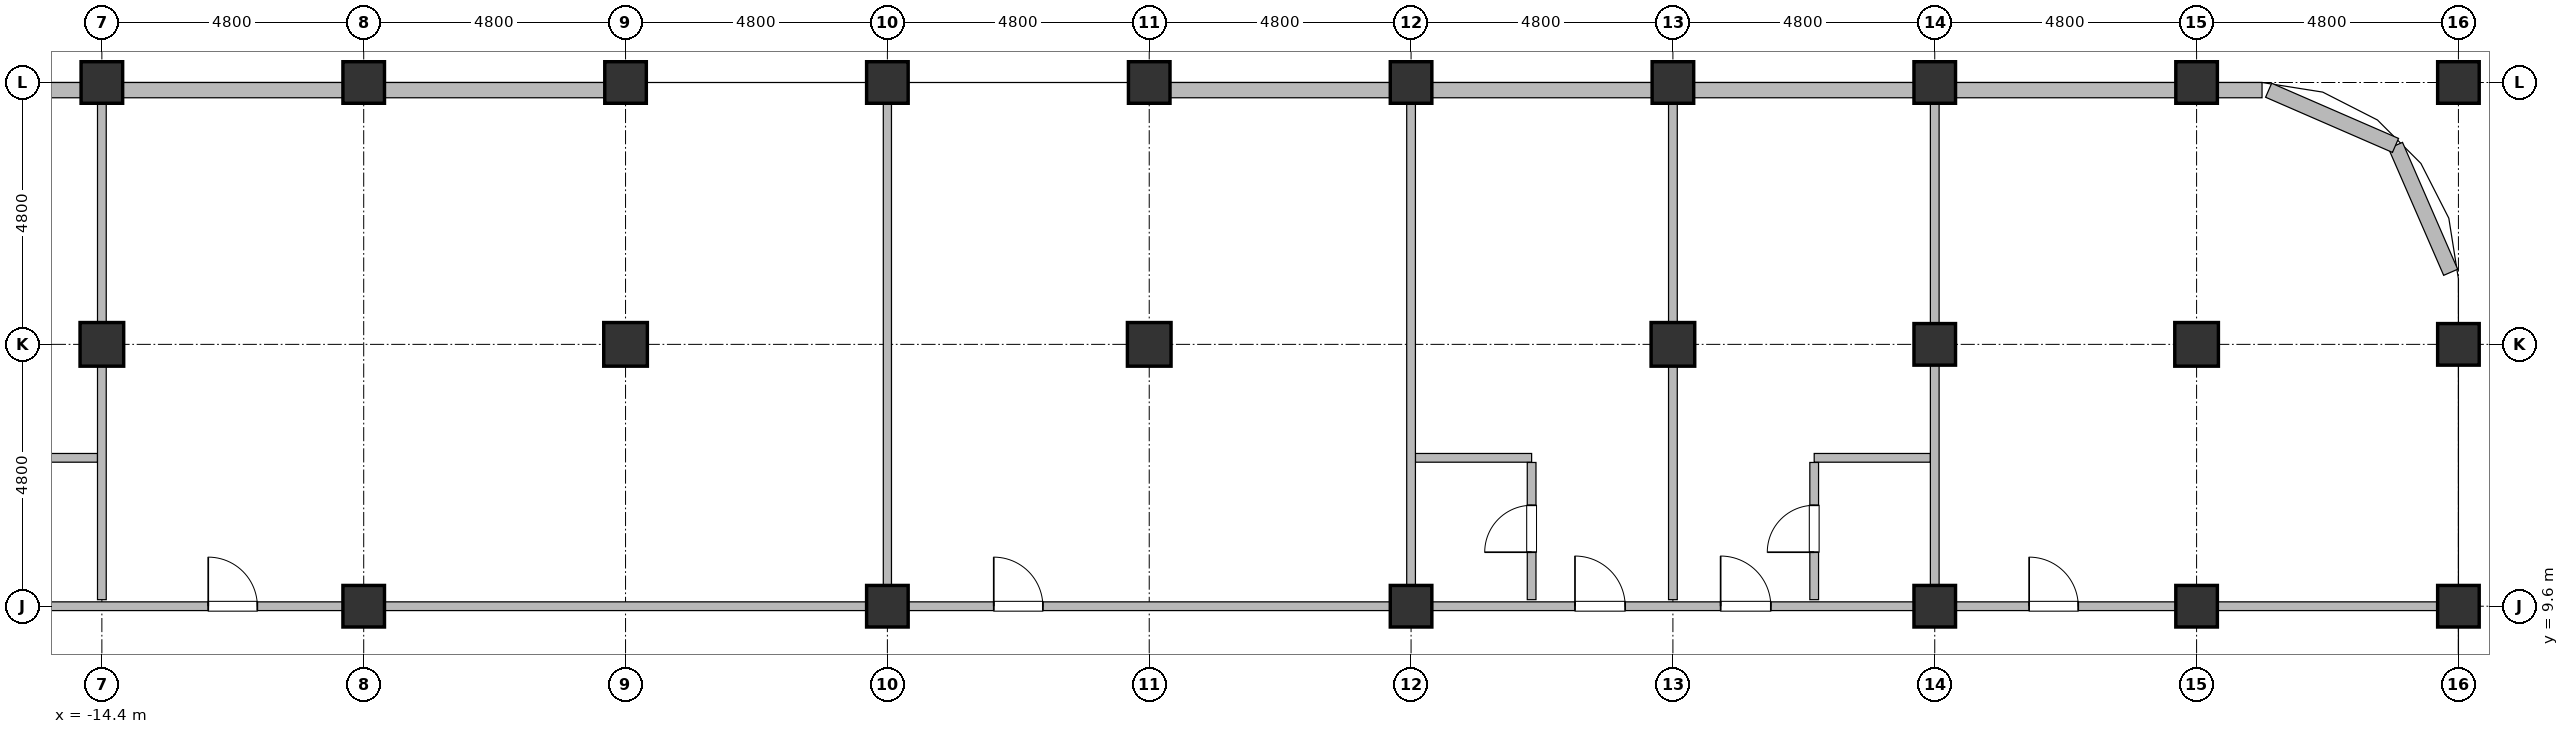
"""IFC4 building model, lengths in metres.
Left out: names, types, materials, properties, quantities, classifications, styles, units other than length and angle.
Written with IfcOpenShell. Run it as: python <this file> out.ifc"""

import sys

from ifc_helpers import new_model, si_unit, direction, frame, frame_2d, origin, origin_2d, place, context, subcontext, project, spatial, rectangle, hollow_rectangle, hollow_circle, extrude, element, fill, save


model = new_model("IFC4")
c1 = context("Model", 3, precision=1e-05, world=origin(), true_north=direction((0.0, 1.0)))
c2 = subcontext(c1, "Body", "Model", "MODEL_VIEW")
j1 = project(units=[si_unit("LENGTHUNIT", "METRE"), si_unit("PLANEANGLEUNIT", "RADIAN")], contexts=[c1])
p1 = place(None, origin())
s1 = spatial("IfcSite", under=j1, at=p1, CompositionType="ELEMENT")
p2 = place(p1, origin())
s2 = spatial("IfcBuilding", under=s1, at=p2, CompositionType="ELEMENT")
p3 = place(p2, frame((0.0, 0.0, 48.5)))
s3 = spatial("IfcBuildingStorey", under=s2, at=p3, CompositionType="ELEMENT", Elevation=48.5)
p4 = place(p3, frame((-14.4, 14.4, 0.0), z_axis=(0.0, 0.0, 1.0), x_axis=(1.0, 0.0, 0.0)))
e1 = element("IfcColumn", 1, at=p4, inside=s3, PredefinedType="COLUMN", context=c2, shape_type="SweptSolid", body=[
    extrude(hollow_rectangle(XDim=0.8, YDim=0.8, WallThickness=0.036, at=origin_2d()), origin(), (0.0, 0.0, 1.0), 3.7),
])
for number, where, z_axis, x_axis in (
    (2, (-14.4, 19.2, 0.0), (0.0, 0.0, 1.0), (1.0, 0.0, 0.0)),
    (3, (-9.6, 9.6, 0.0), (0.0, 0.0, 1.0), (1.0, 0.0, 0.0)),
    (4, (-9.6, 19.2, 0.0), (0.0, 0.0, 1.0), (1.0, 0.0, 0.0)),
):
    element("IfcColumn", number, at=place(p3, frame(where, z_axis=z_axis, x_axis=x_axis)), inside=s3, PredefinedType="COLUMN", context=c2, shape_type="SweptSolid", body=[
        extrude(hollow_circle(Radius=0.381, WallThickness=0.032, at=origin_2d()), origin(), (0.0, 0.0, 1.0), 3.7),
    ])
p5 = place(p3, frame((-4.8, 14.4, 0.0), z_axis=(0.0, 0.0, 1.0), x_axis=(1.0, 0.0, 0.0)))
e5 = element("IfcColumn", 5, at=p5, inside=s3, PredefinedType="COLUMN", context=c2, shape_type="SweptSolid", body=[
    extrude(hollow_rectangle(XDim=0.8, YDim=0.8, WallThickness=0.036, at=origin_2d()), origin(), (0.0, 0.0, 1.0), 3.7),
])
for number, where, z_axis, x_axis in (
    (6, (-4.8, 19.2, 0.0), (0.0, 0.0, 1.0), (1.0, 0.0, 0.0)),
    (7, (0.0, 9.6, 0.0), (0.0, 0.0, 1.0), (1.0, 0.0, 0.0)),
    (8, (0.0, 19.2, 0.0), (0.0, 0.0, 1.0), (1.0, 0.0, 0.0)),
):
    element("IfcColumn", number, at=place(p3, frame(where, z_axis=z_axis, x_axis=x_axis)), inside=s3, PredefinedType="COLUMN", context=c2, shape_type="SweptSolid", body=[
        extrude(hollow_circle(Radius=0.381, WallThickness=0.032, at=origin_2d()), origin(), (0.0, 0.0, 1.0), 3.7),
    ])
p6 = place(p3, frame((4.8, 14.4, 0.0), z_axis=(0.0, 0.0, 1.0), x_axis=(1.0, 0.0, 0.0)))
e9 = element("IfcColumn", 9, at=p6, inside=s3, PredefinedType="COLUMN", context=c2, shape_type="SweptSolid", body=[
    extrude(hollow_rectangle(XDim=0.8, YDim=0.8, WallThickness=0.036, at=origin_2d()), origin(), (0.0, 0.0, 1.0), 3.7),
])
for number, where, z_axis, x_axis in (
    (10, (4.8, 19.2, 0.0), (0.0, 0.0, 1.0), (1.0, 0.0, 0.0)),
    (11, (9.6, 9.6, 0.0), (0.0, 0.0, 1.0), (1.0, 0.0, 0.0)),
    (12, (9.6, 19.2, 0.0), (0.0, 0.0, 1.0), (1.0, 0.0, 0.0)),
):
    element("IfcColumn", number, at=place(p3, frame(where, z_axis=z_axis, x_axis=x_axis)), inside=s3, PredefinedType="COLUMN", context=c2, shape_type="SweptSolid", body=[
        extrude(hollow_circle(Radius=0.381, WallThickness=0.032, at=origin_2d()), origin(), (0.0, 0.0, 1.0), 3.7),
    ])
p7 = place(p3, frame((14.4, 14.4, 0.0), z_axis=(0.0, 0.0, 1.0), x_axis=(1.0, 0.0, 0.0)))
e13 = element("IfcColumn", 13, at=p7, inside=s3, PredefinedType="COLUMN", context=c2, shape_type="SweptSolid", body=[
    extrude(hollow_rectangle(XDim=0.8, YDim=0.8, WallThickness=0.036, at=origin_2d()), origin(), (0.0, 0.0, 1.0), 3.7),
])
for number, where, z_axis, x_axis in (
    (14, (14.4, 19.2, 0.0), (0.0, 0.0, 1.0), (1.0, 0.0, 0.0)),
    (15, (19.2, 9.6, 0.0), (0.0, 0.0, 1.0), (1.0, 0.0, 0.0)),
    (16, (19.2, 14.4, 0.0), (0.0, 0.0, 1.0), (1.0, 0.0, 0.0)),
    (17, (19.2, 19.2, 0.0), (0.0, 0.0, 1.0), (1.0, 0.0, 0.0)),
    (18, (24.0, 9.6, 0.0), (0.0, 0.0, 1.0), (1.0, 0.0, 0.0)),
):
    element("IfcColumn", number, at=place(p3, frame(where, z_axis=z_axis, x_axis=x_axis)), inside=s3, PredefinedType="COLUMN", context=c2, shape_type="SweptSolid", body=[
        extrude(hollow_circle(Radius=0.381, WallThickness=0.032, at=origin_2d()), origin(), (0.0, 0.0, 1.0), 3.7),
    ])
p8 = place(p3, frame((24.0, 14.4, 0.0), z_axis=(0.0, 0.0, 1.0), x_axis=(1.0, 0.0, 0.0)))
e19 = element("IfcColumn", 19, at=p8, inside=s3, PredefinedType="COLUMN", context=c2, shape_type="SweptSolid", body=[
    extrude(hollow_rectangle(XDim=0.8, YDim=0.8, WallThickness=0.036, at=origin_2d()), origin(), (0.0, 0.0, 1.0), 3.7),
])
for number, where, z_axis, x_axis in (
    (20, (24.0, 19.2, 0.0), (0.0, 0.0, 1.0), (1.0, 0.0, 0.0)),
    (21, (28.8, 9.6, 0.0), (0.0, 0.0, 1.0), (1.0, 0.0, 0.0)),
    (22, (28.8, 14.4, 0.0), (0.0, 0.0, 1.0), (1.0, 0.0, 0.0)),
    (23, (28.8, 19.2, 0.0), (0.0, 0.0, 1.0), (1.0, 0.0, 0.0)),
):
    element("IfcColumn", number, at=place(p3, frame(where, z_axis=z_axis, x_axis=x_axis)), inside=s3, PredefinedType="COLUMN", context=c2, shape_type="SweptSolid", body=[
        extrude(hollow_circle(Radius=0.381, WallThickness=0.032, at=origin_2d()), origin(), (0.0, 0.0, 1.0), 3.7),
    ])
p9 = place(p3, frame((28.658, 15.721, 0.0), z_axis=(0.0, 0.0, 1.0), x_axis=(-0.398792985289, 0.917040977756, 0.0)))
e24 = element("IfcWall", 24, at=p9, inside=s3, PredefinedType="SOLIDWALL", context=c2, shape_type="SweptSolid", body=[
    extrude(rectangle(XDim=2.536, YDim=0.28, at=frame_2d((1.268, 0.0))), origin(), (0.0, 0.0, 1.0), 2.82),
])
p10 = place(p3, frame((27.646, 18.047, 0.0), z_axis=(0.0, 0.0, 1.0), x_axis=(-0.917060872934, 0.398747232384, 0.0)))
e25 = element("IfcWall", 25, at=p10, inside=s3, PredefinedType="SOLIDWALL", context=c2, shape_type="SweptSolid", body=[
    extrude(rectangle(XDim=2.536, YDim=0.28, at=frame_2d((1.268, 0.0))), origin(), (0.0, 0.0, 1.0), 2.62),
])
p11 = place(p3, frame((-30.0, 19.06, 0.0), z_axis=(0.0, 0.0, 1.0), x_axis=(1.0, 0.0, 0.0)))
e26 = element("IfcWall", 26, at=p11, inside=s3, PredefinedType="SOLIDWALL", context=c2, shape_type="SweptSolid", body=[
    extrude(rectangle(XDim=25.25, YDim=0.28, at=frame_2d((12.625, 0.0))), origin(), (0.0, 0.0, 1.0), 2.12),
])
p12 = place(p11, frame((9.0, 0.0, 0.75)))
e27 = element("IfcOpeningElement", 27, at=p12, cuts=e26, PredefinedType="OPENING", context=c2, shape_type="SweptSolid", body=[
    extrude(rectangle(XDim=1.2, YDim=1.15, at=frame_2d((0.6, 0.575))), frame((0.0, 0.155, 0.0), z_axis=(0.0, -1.0, 0.0), x_axis=(1.0, 0.0, 0.0)), (0.0, 0.0, 1.0), 0.31),
])
p13 = place(p11, frame((12.3, 0.0, 0.75)))
e28 = element("IfcOpeningElement", 28, at=p13, cuts=e26, PredefinedType="OPENING", context=c2, shape_type="SweptSolid", body=[
    extrude(rectangle(XDim=1.8, YDim=1.15, at=frame_2d((0.9, 0.575))), frame((0.0, 0.155, 0.0), z_axis=(0.0, -1.0, 0.0), x_axis=(1.0, 0.0, 0.0)), (0.0, 0.0, 1.0), 0.31),
])
p14 = place(p3, frame((4.75, 19.06, 0.0), z_axis=(0.0, 0.0, 1.0), x_axis=(1.0, 0.0, 0.0)))
e29 = element("IfcWall", 29, at=p14, inside=s3, PredefinedType="SOLIDWALL", context=c2, shape_type="SweptSolid", body=[
    extrude(rectangle(XDim=20.45, YDim=0.28, at=frame_2d((10.225, 0.0))), origin(), (0.0, 0.0, 1.0), 2.62),
])
p15 = place(p14, frame((6.35, 0.0, 0.75)))
e30 = element("IfcOpeningElement", 30, at=p15, cuts=e29, PredefinedType="OPENING", context=c2, shape_type="SweptSolid", body=[
    extrude(rectangle(XDim=1.8, YDim=1.7, at=frame_2d((0.9, 0.85))), frame((0.0, 0.155, 0.0), z_axis=(0.0, -1.0, 0.0), x_axis=(1.0, 0.0, 0.0)), (0.0, 0.0, 1.0), 0.31),
])
p16 = place(p14, frame((11.15, 0.0, 0.75)))
e31 = element("IfcOpeningElement", 31, at=p16, cuts=e29, PredefinedType="OPENING", context=c2, shape_type="SweptSolid", body=[
    extrude(rectangle(XDim=1.8, YDim=1.7, at=frame_2d((0.9, 0.85))), frame((0.0, 0.155, 0.0), z_axis=(0.0, -1.0, 0.0), x_axis=(1.0, 0.0, 0.0)), (0.0, 0.0, 1.0), 0.31),
])
p17 = place(p3, frame((-33.43, 9.6, 0.0), z_axis=(0.0, 0.0, 1.0), x_axis=(1.0, 0.0, 0.0)))
e32 = element("IfcWall", 32, at=p17, inside=s3, PredefinedType="PARTITIONING", context=c2, shape_type="SweptSolid", body=[
    extrude(rectangle(XDim=62.06, YDim=0.16, at=frame_2d((31.03, 0.0))), origin(), (0.0, 0.0, 1.0), 2.62),
])
p18 = place(p17, frame((6.8, 0.0, 0.0)))
e33 = element("IfcOpeningElement", 33, at=p18, cuts=e32, PredefinedType="OPENING", context=c2, shape_type="SweptSolid", body=[
    extrude(rectangle(XDim=0.9, YDim=2.1, at=frame_2d((0.45, 1.05))), frame((0.0, 0.095, 0.0), z_axis=(0.0, -1.0, 0.0), x_axis=(1.0, 0.0, 0.0)), (0.0, 0.0, 1.0), 0.19),
])
p19 = place(p17, frame((54.361, 0.0, 0.0)))
e34 = element("IfcOpeningElement", 34, at=p19, cuts=e32, PredefinedType="OPENING", context=c2, shape_type="SweptSolid", body=[
    extrude(rectangle(XDim=0.9, YDim=2.1, at=frame_2d((0.45, 1.05))), frame((0.0, 0.095, 0.0), z_axis=(0.0, -1.0, 0.0), x_axis=(1.0, 0.0, 0.0)), (0.0, 0.0, 1.0), 0.19),
])
p20 = place(p17, frame((10.69, 0.0, 0.0)))
e35 = element("IfcOpeningElement", 35, at=p20, cuts=e32, PredefinedType="OPENING", context=c2, shape_type="SweptSolid", body=[
    extrude(rectangle(XDim=0.9, YDim=2.1, at=frame_2d((0.45, 1.05))), frame((0.0, 0.095, 0.0), z_axis=(0.0, -1.0, 0.0), x_axis=(1.0, 0.0, 0.0)), (0.0, 0.0, 1.0), 0.19),
])
p21 = place(p17, frame((12.07, 0.0, 0.0)))
e36 = element("IfcOpeningElement", 36, at=p21, cuts=e32, PredefinedType="OPENING", context=c2, shape_type="SweptSolid", body=[
    extrude(rectangle(XDim=0.9, YDim=2.1, at=frame_2d((0.45, 1.05))), frame((0.0, 0.095, 0.0), z_axis=(0.0, -1.0, 0.0), x_axis=(1.0, 0.0, 0.0)), (0.0, 0.0, 1.0), 0.19),
])
p22 = place(p17, frame((15.6, 0.0, 0.0)))
e37 = element("IfcOpeningElement", 37, at=p22, cuts=e32, PredefinedType="OPENING", context=c2, shape_type="SweptSolid", body=[
    extrude(rectangle(XDim=0.92, YDim=2.15, at=frame_2d((0.46, 1.075))), frame((0.0, 0.095, 0.0), z_axis=(0.0, -1.0, 0.0), x_axis=(1.0, 0.0, 0.0)), (0.0, 0.0, 1.0), 0.19),
])
p23 = place(p17, frame((20.98, 0.0, 0.0)))
e38 = element("IfcOpeningElement", 38, at=p23, cuts=e32, PredefinedType="OPENING", context=c2, shape_type="SweptSolid", body=[
    extrude(rectangle(XDim=0.9, YDim=2.1, at=frame_2d((0.45, 1.05))), frame((0.0, 0.095, 0.0), z_axis=(0.0, -1.0, 0.0), x_axis=(1.0, 0.0, 0.0)), (0.0, 0.0, 1.0), 0.19),
])
p24 = place(p17, frame((35.38, 0.0, 0.0)))
e39 = element("IfcOpeningElement", 39, at=p24, cuts=e32, PredefinedType="OPENING", context=c2, shape_type="SweptSolid", body=[
    extrude(rectangle(XDim=0.9, YDim=2.1, at=frame_2d((0.45, 1.05))), frame((0.0, 0.095, 0.0), z_axis=(0.0, -1.0, 0.0), x_axis=(1.0, 0.0, 0.0)), (0.0, 0.0, 1.0), 0.19),
])
p25 = place(p17, frame((46.035, 0.0, 0.0)))
e40 = element("IfcOpeningElement", 40, at=p25, cuts=e32, PredefinedType="OPENING", context=c2, shape_type="SweptSolid", body=[
    extrude(rectangle(XDim=0.92, YDim=2.15, at=frame_2d((0.46, 1.075))), frame((0.0, 0.095, 0.0), z_axis=(0.0, -1.0, 0.0), x_axis=(1.0, 0.0, 0.0)), (0.0, 0.0, 1.0), 0.19),
])
p26 = place(p17, frame((48.705, 0.0, 0.0)))
e41 = element("IfcOpeningElement", 41, at=p26, cuts=e32, PredefinedType="OPENING", context=c2, shape_type="SweptSolid", body=[
    extrude(rectangle(XDim=0.92, YDim=2.15, at=frame_2d((0.46, 1.075))), frame((0.0, 0.095, 0.0), z_axis=(0.0, -1.0, 0.0), x_axis=(1.0, 0.0, 0.0)), (0.0, 0.0, 1.0), 0.19),
])
p27 = place(p3, frame((-16.61, 12.32, 0.0), z_axis=(0.0, 0.0, 1.0), x_axis=(1.0, 0.0, 0.0)))
e42 = element("IfcWall", 42, at=p27, inside=s3, PredefinedType="PARTITIONING", context=c2, shape_type="SweptSolid", body=[
    extrude(rectangle(XDim=2.13, YDim=0.16, at=frame_2d((1.065, 0.0))), origin(), (0.0, 0.0, 1.0), 2.82),
])
p28 = place(p3, frame((9.68, 12.32, 0.0), z_axis=(0.0, 0.0, 1.0), x_axis=(1.0, 0.0, 0.0)))
e43 = element("IfcWall", 43, at=p28, inside=s3, PredefinedType="PARTITIONING", context=c2, shape_type="SweptSolid", body=[
    extrude(rectangle(XDim=2.13, YDim=0.16, at=frame_2d((1.065, 0.0))), origin(), (0.0, 0.0, 1.0), 3.07),
])
p29 = place(p3, frame((16.99, 12.32, 0.0), z_axis=(0.0, 0.0, 1.0), x_axis=(1.0, 0.0, 0.0)))
e44 = element("IfcWall", 44, at=p29, inside=s3, PredefinedType="PARTITIONING", context=c2, shape_type="SweptSolid", body=[
    extrude(rectangle(XDim=2.13, YDim=0.16, at=frame_2d((1.065, 0.0))), origin(), (0.0, 0.0, 1.0), 2.82),
])
p30 = place(p3, frame((-14.4, 9.72, 0.0), z_axis=(0.0, 0.0, 1.0), x_axis=(0.0, 1.0, 0.0)))
e45 = element("IfcWall", 45, at=p30, inside=s3, PredefinedType="PARTITIONING", context=c2, shape_type="SweptSolid", body=[
    extrude(rectangle(XDim=9.19, YDim=0.16, at=frame_2d((4.595, 0.0))), origin(), (0.0, 0.0, 1.0), 2.62),
])
p31 = place(p3, frame((0.0, 9.72, 0.0), z_axis=(0.0, 0.0, 1.0), x_axis=(0.0, 1.0, 0.0)))
e46 = element("IfcWall", 46, at=p31, inside=s3, PredefinedType="PARTITIONING", context=c2, shape_type="SweptSolid", body=[
    extrude(rectangle(XDim=9.275, YDim=0.15, at=frame_2d((4.638, 0.0))), origin(), (0.0, 0.0, 1.0), 2.62),
])
p32 = place(p3, frame((9.6, 9.72, 0.0), z_axis=(0.0, 0.0, 1.0), x_axis=(0.0, 1.0, 0.0)))
e47 = element("IfcWall", 47, at=p32, inside=s3, PredefinedType="PARTITIONING", context=c2, shape_type="SweptSolid", body=[
    extrude(rectangle(XDim=9.19, YDim=0.16, at=frame_2d((4.595, 0.0))), origin(), (0.0, 0.0, 1.0), 2.62),
])
p33 = place(p3, frame((11.81, 9.72, 0.0), z_axis=(0.0, 0.0, 1.0), x_axis=(0.0, 1.0, 0.0)))
e48 = element("IfcWall", 48, at=p33, inside=s3, PredefinedType="PARTITIONING", context=c2, shape_type="SweptSolid", body=[
    extrude(rectangle(XDim=2.515, YDim=0.16, at=frame_2d((1.258, 0.0))), origin(), (0.0, 0.0, 1.0), 2.62),
])
p34 = place(p33, frame((0.87, 0.0, 0.0)))
e49 = element("IfcOpeningElement", 49, at=p34, cuts=e48, PredefinedType="OPENING", context=c2, shape_type="SweptSolid", body=[
    extrude(rectangle(XDim=0.86, YDim=2.1, at=frame_2d((0.43, 1.05))), frame((0.0, 0.095, 0.0), z_axis=(0.0, -1.0, 0.0), x_axis=(1.0, 0.0, 0.0)), (0.0, 0.0, 1.0), 0.19),
])
p35 = place(p3, frame((14.4, 9.72, 0.0), z_axis=(0.0, 0.0, 1.0), x_axis=(0.0, 1.0, 0.0)))
e50 = element("IfcWall", 50, at=p35, inside=s3, PredefinedType="PARTITIONING", context=c2, shape_type="SweptSolid", body=[
    extrude(rectangle(XDim=9.19, YDim=0.16, at=frame_2d((4.595, 0.0))), origin(), (0.0, 0.0, 1.0), 2.62),
])
p36 = place(p3, frame((16.99, 9.72, 0.0), z_axis=(0.0, 0.0, 1.0), x_axis=(0.0, 1.0, 0.0)))
e51 = element("IfcWall", 51, at=p36, inside=s3, PredefinedType="PARTITIONING", context=c2, shape_type="SweptSolid", body=[
    extrude(rectangle(XDim=2.515, YDim=0.16, at=frame_2d((1.258, 0.0))), origin(), (0.0, 0.0, 1.0), 2.62),
])
p37 = place(p36, frame((0.87, 0.0, 0.0)))
e52 = element("IfcOpeningElement", 52, at=p37, cuts=e51, PredefinedType="OPENING", context=c2, shape_type="SweptSolid", body=[
    extrude(rectangle(XDim=0.86, YDim=2.1, at=frame_2d((0.43, 1.05))), frame((0.0, 0.095, 0.0), z_axis=(0.0, -1.0, 0.0), x_axis=(1.0, 0.0, 0.0)), (0.0, 0.0, 1.0), 0.19),
])
p38 = place(p3, frame((19.2, 9.72, 0.0), z_axis=(0.0, 0.0, 1.0), x_axis=(0.0, 1.0, 0.0)))
e53 = element("IfcWall", 53, at=p38, inside=s3, PredefinedType="PARTITIONING", context=c2, shape_type="SweptSolid", body=[
    extrude(rectangle(XDim=9.19, YDim=0.16, at=frame_2d((4.595, 0.0))), origin(), (0.0, 0.0, 1.0), 2.62),
])
p39 = place(p15, origin())
e54 = element("IfcWindow", 54, at=p39, inside=s3, PartitioningType="SINGLE_PANEL", PredefinedType="WINDOW", context=c2, shape_type="SweptSolid", body=[
    extrude(rectangle(XDim=1.8, YDim=1.7, at=frame_2d((0.9, 0.85))), frame((0.0, 0.03, 0.0), z_axis=(0.0, -1.0, 0.0), x_axis=(1.0, 0.0, 0.0)), (0.0, 0.0, 1.0), 0.06),
])
fill(e30, e54)
p40 = place(p16, origin())
e55 = element("IfcWindow", 55, at=p40, inside=s3, PartitioningType="SINGLE_PANEL", PredefinedType="WINDOW", context=c2, shape_type="SweptSolid", body=[
    extrude(rectangle(XDim=1.8, YDim=1.7, at=frame_2d((0.9, 0.85))), frame((0.0, 0.03, 0.0), z_axis=(0.0, -1.0, 0.0), x_axis=(1.0, 0.0, 0.0)), (0.0, 0.0, 1.0), 0.06),
])
fill(e31, e55)
p41 = place(p19, origin())
e56 = element("IfcDoor", 56, at=p41, inside=s3, OperationType="SINGLE_SWING_LEFT", PredefinedType="DOOR", context=c2, shape_type="SweptSolid", body=[
    extrude(rectangle(XDim=0.9, YDim=2.1, at=frame_2d((0.45, 1.05))), frame((0.0, 0.025, 0.0), z_axis=(0.0, -1.0, 0.0), x_axis=(1.0, 0.0, 0.0)), (0.0, 0.0, 1.0), 0.05),
])
fill(e34, e56)
p42 = place(p23, origin())
e57 = element("IfcDoor", 57, at=p42, inside=s3, OperationType="SINGLE_SWING_RIGHT", PredefinedType="DOOR", context=c2, shape_type="SweptSolid", body=[
    extrude(rectangle(XDim=0.9, YDim=2.1, at=frame_2d((0.45, 1.05))), frame((0.0, 0.025, 0.0), z_axis=(0.0, -1.0, 0.0), x_axis=(1.0, 0.0, 0.0)), (0.0, 0.0, 1.0), 0.05),
])
fill(e38, e57)
p43 = place(p24, origin())
e58 = element("IfcDoor", 58, at=p43, inside=s3, OperationType="SINGLE_SWING_LEFT", PredefinedType="DOOR", context=c2, shape_type="SweptSolid", body=[
    extrude(rectangle(XDim=0.9, YDim=2.1, at=frame_2d((0.45, 1.05))), frame((0.0, 0.025, 0.0), z_axis=(0.0, -1.0, 0.0), x_axis=(1.0, 0.0, 0.0)), (0.0, 0.0, 1.0), 0.05),
])
fill(e39, e58)
p44 = place(p25, origin())
e59 = element("IfcDoor", 59, at=p44, inside=s3, OperationType="SINGLE_SWING_RIGHT", PredefinedType="DOOR", context=c2, shape_type="SweptSolid", body=[
    extrude(rectangle(XDim=0.92, YDim=2.15, at=frame_2d((0.46, 1.075))), frame((0.0, 0.025, 0.0), z_axis=(0.0, -1.0, 0.0), x_axis=(1.0, 0.0, 0.0)), (0.0, 0.0, 1.0), 0.05),
])
fill(e40, e59)
p45 = place(p34, origin())
e60 = element("IfcDoor", 60, at=p45, inside=s3, OperationType="SINGLE_SWING_LEFT", PredefinedType="DOOR", context=c2, shape_type="SweptSolid", body=[
    extrude(rectangle(XDim=0.86, YDim=2.1, at=frame_2d((0.43, 1.05))), frame((0.0, 0.025, 0.0), z_axis=(0.0, -1.0, 0.0), x_axis=(1.0, 0.0, 0.0)), (0.0, 0.0, 1.0), 0.05),
])
fill(e49, e60)
p46 = place(p26, origin())
e61 = element("IfcDoor", 61, at=p46, inside=s3, OperationType="SINGLE_SWING_RIGHT", PredefinedType="DOOR", context=c2, shape_type="SweptSolid", body=[
    extrude(rectangle(XDim=0.92, YDim=2.15, at=frame_2d((0.46, 1.075))), frame((0.0, 0.025, 0.0), z_axis=(0.0, -1.0, 0.0), x_axis=(1.0, 0.0, 0.0)), (0.0, 0.0, 1.0), 0.05),
])
fill(e41, e61)
p47 = place(p37, origin())
e62 = element("IfcDoor", 62, at=p47, inside=s3, OperationType="SINGLE_SWING_LEFT", PredefinedType="DOOR", context=c2, shape_type="SweptSolid", body=[
    extrude(rectangle(XDim=0.86, YDim=2.1, at=frame_2d((0.43, 1.05))), frame((0.0, 0.025, 0.0), z_axis=(0.0, -1.0, 0.0), x_axis=(1.0, 0.0, 0.0)), (0.0, 0.0, 1.0), 0.05),
])
fill(e52, e62)
save(model, sys.argv[1])
